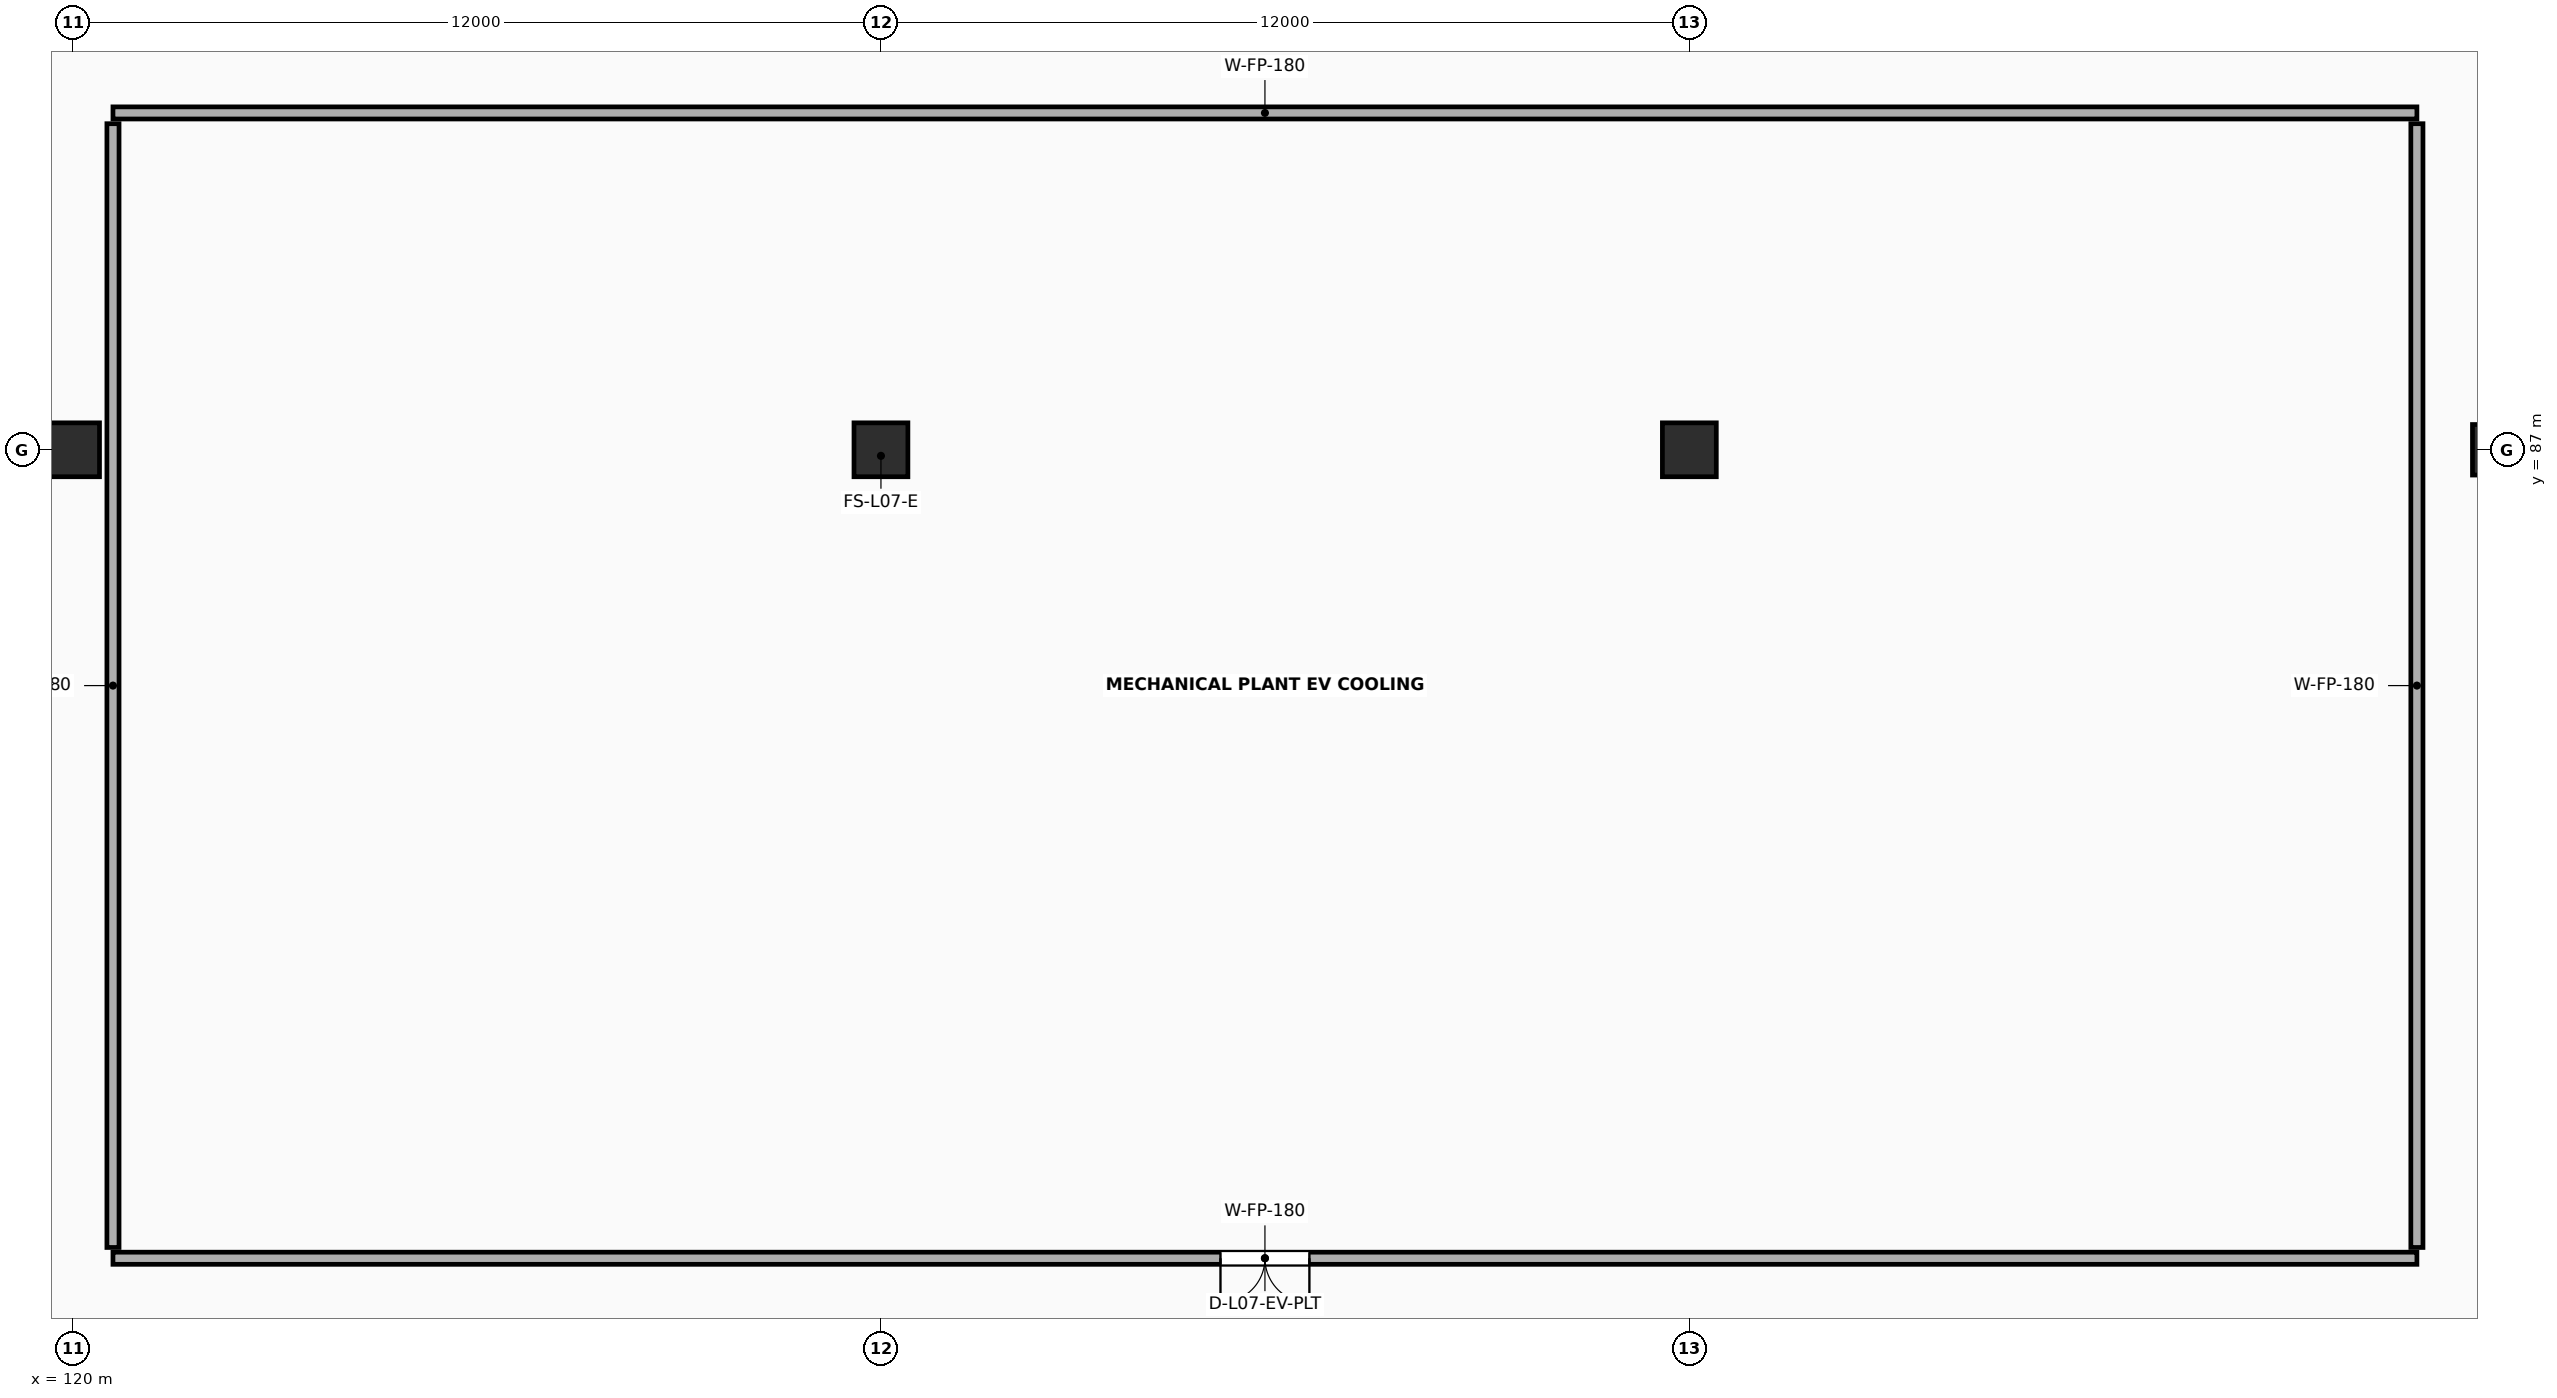
"""IFC4 building model, lengths in metres.
Left out: names, types, materials, properties, quantities, classifications, styles, units other than length and angle.
Written with IfcOpenShell. Run it as: python <this file> out.ifc"""

import sys

from ifc_helpers import new_model, si_unit, direction, frame, frame_2d, origin, origin_2d, place, context, subcontext, project, spatial, rectangle, extrude, element, fill, save


model = new_model("IFC4")
c1 = context("Model", 3, precision=1e-05, world=origin(), true_north=direction((0.0, 1.0)))
c2 = subcontext(c1, "Body", "Model", "MODEL_VIEW")
j1 = project(units=[si_unit("LENGTHUNIT", "METRE"), si_unit("PLANEANGLEUNIT", "RADIAN")], contexts=[c1])
p1 = place(None, origin())
s1 = spatial("IfcSite", under=j1, at=p1, CompositionType="ELEMENT")
p2 = place(p1, origin())
s2 = spatial("IfcBuilding", under=s1, at=p2, CompositionType="ELEMENT")
p3 = place(p2, frame((0.0, 0.0, 28.6)))
s3 = spatial("IfcBuildingStorey", under=s2, at=p3, CompositionType="ELEMENT", Elevation=28.6)
for number, where, z_axis, x_axis in (
    (1, (120.0, 87.0, 0.0), (0.0, 0.0, 1.0), (1.0, 0.0, 0.0)),
    (2, (132.0, 87.0, 0.0), (0.0, 0.0, 1.0), (1.0, 0.0, 0.0)),
    (3, (144.0, 87.0, 0.0), (0.0, 0.0, 1.0), (1.0, 0.0, 0.0)),
):
    element("IfcColumn", number, at=place(p3, frame(where, z_axis=z_axis, x_axis=x_axis)), inside=s3, PredefinedType="COLUMN", context=c2, shape_type="SweptSolid", body=[
        extrude(rectangle(XDim=0.8, YDim=0.8, at=origin_2d()), origin(), (0.0, 0.0, 1.0), 3.8),
    ])
p4 = place(p3, frame((156.0, 87.0, 0.0), z_axis=(0.0, 0.0, 1.0), x_axis=(1.0, 0.0, 0.0)))
e4 = element("IfcColumn", 4, at=p4, inside=s3, PredefinedType="COLUMN", context=c2, shape_type="SweptSolid", body=[
    extrude(rectangle(XDim=0.75, YDim=0.75, at=origin_2d()), origin(), (0.0, 0.0, 1.0), 3.8),
])
p5 = place(p3, frame((120.6, 75.0, 0.0), z_axis=(0.0, 0.0, 1.0), x_axis=(1.0, 0.0, 0.0)))
e5 = element("IfcWall", 5, at=p5, inside=s3, PredefinedType="SOLIDWALL", context=c2, shape_type="SweptSolid", body=[
    extrude(rectangle(XDim=34.2, YDim=0.18, at=frame_2d((17.1, 0.0))), origin(), (0.0, 0.0, 1.0), 2.64),
])
p6 = place(p5, frame((16.44, 0.0, 0.0)))
e6 = element("IfcOpeningElement", 6, at=p6, cuts=e5, PredefinedType="OPENING", context=c2, shape_type="SweptSolid", body=[
    extrude(rectangle(XDim=1.32, YDim=2.26, at=frame_2d((0.66, 1.13))), frame((0.0, 0.105, 0.0), z_axis=(0.0, -1.0, 0.0), x_axis=(1.0, 0.0, 0.0)), (0.0, 0.0, 1.0), 0.21),
])
p7 = place(p3, frame((120.6, 92.0, 0.0), z_axis=(0.0, 0.0, 1.0), x_axis=(1.0, 0.0, 0.0)))
e7 = element("IfcWall", 7, at=p7, inside=s3, PredefinedType="SOLIDWALL", context=c2, shape_type="SweptSolid", body=[
    extrude(rectangle(XDim=34.2, YDim=0.18, at=frame_2d((17.1, 0.0))), origin(), (0.0, 0.0, 1.0), 2.64),
])
for number, where, z_axis, x_axis in (
    (8, (120.6, 75.16, 0.0), (0.0, 0.0, 1.0), (0.0, 1.0, 0.0)),
    (9, (154.8, 75.16, 0.0), (0.0, 0.0, 1.0), (0.0, 1.0, 0.0)),
):
    element("IfcWall", number, at=place(p3, frame(where, z_axis=z_axis, x_axis=x_axis)), inside=s3, PredefinedType="SOLIDWALL", context=c2, shape_type="SweptSolid", body=[
        extrude(rectangle(XDim=16.68, YDim=0.18, at=frame_2d((8.34, 0.0))), origin(), (0.0, 0.0, 1.0), 2.64),
    ])
p8 = place(p6, origin())
e10 = element("IfcDoor", 10, at=p8, inside=s3, OperationType="DOUBLE_DOOR_SINGLE_SWING", PredefinedType="DOOR", context=c2, shape_type="SweptSolid", body=[
    extrude(rectangle(XDim=1.32, YDim=2.26, at=frame_2d((0.66, 1.13))), frame((0.0, 0.025, 0.0), z_axis=(0.0, -1.0, 0.0), x_axis=(1.0, 0.0, 0.0)), (0.0, 0.0, 1.0), 0.05),
])
fill(e6, e10)
save(model, sys.argv[1])
